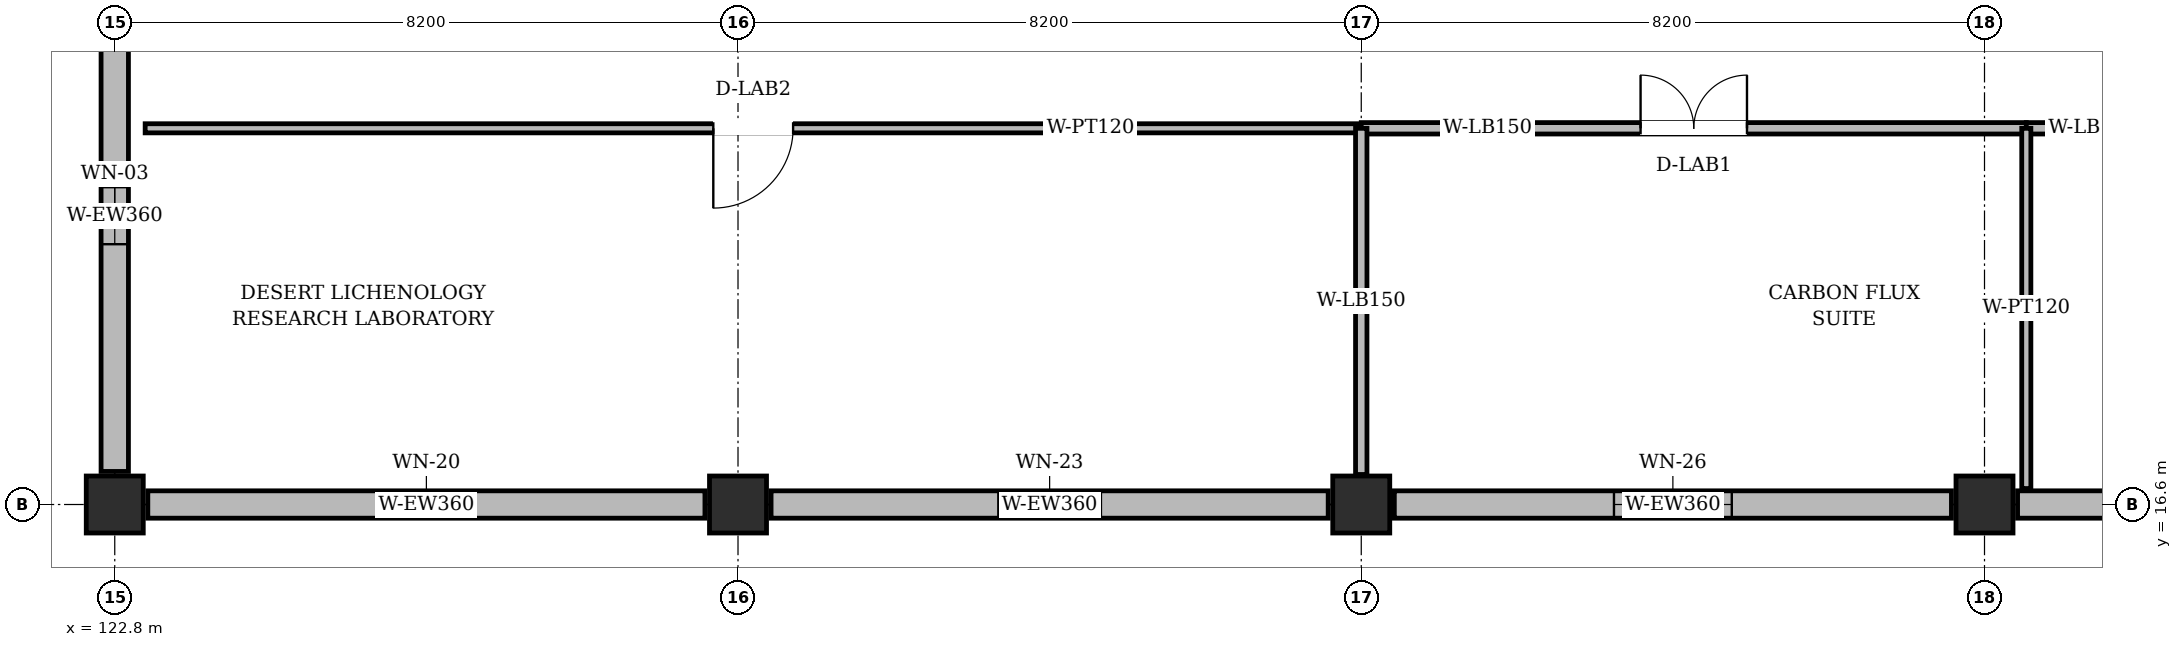
"""IFC4 building model, lengths in metres.
Left out: names, types, materials, properties, quantities, classifications, styles, units other than length and angle.
Written with IfcOpenShell. Run it as: python <this file> out.ifc"""

import sys

from ifc_helpers import new_model, si_unit, direction, frame, frame_2d, origin, origin_2d, place, context, subcontext, project, spatial, rectangle, extrude, element, fill, save


model = new_model("IFC4")
c1 = context("Model", 3, precision=1e-05, world=origin(), true_north=direction((0.0, 1.0)))
c2 = subcontext(c1, "Body", "Model", "MODEL_VIEW")
j1 = project(units=[si_unit("LENGTHUNIT", "METRE"), si_unit("PLANEANGLEUNIT", "RADIAN")], contexts=[c1])
p1 = place(None, origin())
s1 = spatial("IfcSite", under=j1, at=p1, CompositionType="ELEMENT")
p2 = place(p1, origin())
s2 = spatial("IfcBuilding", under=s1, at=p2, CompositionType="ELEMENT")
p3 = place(p2, frame((0.0, 0.0, 49.2)))
s3 = spatial("IfcBuildingStorey", under=s2, at=p3, CompositionType="ELEMENT", Elevation=49.2)
for number, where, z_axis, x_axis in (
    (1, (122.8, 16.6, 0.0), (0.0, 0.0, 1.0), (1.0, 0.0, 0.0)),
    (2, (131.0, 16.6, 0.0), (0.0, 0.0, 1.0), (1.0, 0.0, 0.0)),
    (3, (139.2, 16.6, 0.0), (0.0, 0.0, 1.0), (1.0, 0.0, 0.0)),
    (4, (147.4, 16.6, 0.0), (0.0, 0.0, 1.0), (1.0, 0.0, 0.0)),
):
    element("IfcColumn", number, at=place(p3, frame(where, z_axis=z_axis, x_axis=x_axis)), inside=s3, PredefinedType="COLUMN", context=c2, shape_type="SweptSolid", body=[
        extrude(rectangle(XDim=0.75, YDim=0.75, at=origin_2d()), origin(), (0.0, 0.0, 1.0), 3.945),
    ])
p4 = place(p3, frame((123.235, 16.6, 0.0), z_axis=(0.0, 0.0, 1.0), x_axis=(1.0, 0.0, 0.0)))
e5 = element("IfcWall", 5, at=p4, inside=s3, PredefinedType="SOLIDWALL", context=c2, shape_type="SweptSolid", body=[
    extrude(rectangle(XDim=7.33, YDim=0.36, at=frame_2d((3.665, 0.0))), origin(), (0.0, 0.0, 1.0), 3.33),
])
p5 = place(p4, frame((3.09, 0.0, 0.95)))
e6 = element("IfcOpeningElement", 6, at=p5, cuts=e5, PredefinedType="OPENING", context=c2, shape_type="SweptSolid", body=[
    extrude(rectangle(XDim=1.15, YDim=2.05, at=frame_2d((0.575, 1.025))), frame((0.0, 0.192, 0.0), z_axis=(0.0, -1.0, 0.0), x_axis=(1.0, 0.0, 0.0)), (0.0, 0.0, 1.0), 0.384),
])
p6 = place(p3, frame((131.435, 16.6, 0.0), z_axis=(0.0, 0.0, 1.0), x_axis=(1.0, 0.0, 0.0)))
e7 = element("IfcWall", 7, at=p6, inside=s3, PredefinedType="SOLIDWALL", context=c2, shape_type="SweptSolid", body=[
    extrude(rectangle(XDim=7.33, YDim=0.36, at=frame_2d((3.665, 0.0))), origin(), (0.0, 0.0, 1.0), 3.33),
])
p7 = place(p6, frame((2.99, 0.0, 0.95)))
e8 = element("IfcOpeningElement", 8, at=p7, cuts=e7, PredefinedType="OPENING", context=c2, shape_type="SweptSolid", body=[
    extrude(rectangle(XDim=1.35, YDim=1.75, at=frame_2d((0.675, 0.875))), frame((0.0, 0.192, 0.0), z_axis=(0.0, -1.0, 0.0), x_axis=(1.0, 0.0, 0.0)), (0.0, 0.0, 1.0), 0.384),
])
p8 = place(p3, frame((139.635, 16.6, 0.0), z_axis=(0.0, 0.0, 1.0), x_axis=(1.0, 0.0, 0.0)))
e9 = element("IfcWall", 9, at=p8, inside=s3, PredefinedType="SOLIDWALL", context=c2, shape_type="SweptSolid", body=[
    extrude(rectangle(XDim=7.33, YDim=0.36, at=frame_2d((3.665, 0.0))), origin(), (0.0, 0.0, 1.0), 3.33),
])
p9 = place(p8, frame((2.89, 0.0, 0.95)))
e10 = element("IfcOpeningElement", 10, at=p9, cuts=e9, PredefinedType="OPENING", context=c2, shape_type="SweptSolid", body=[
    extrude(rectangle(XDim=1.55, YDim=1.5, at=frame_2d((0.775, 0.75))), frame((0.0, 0.192, 0.0), z_axis=(0.0, -1.0, 0.0), x_axis=(1.0, 0.0, 0.0)), (0.0, 0.0, 1.0), 0.384),
])
p10 = place(p3, frame((147.835, 16.6, 0.0), z_axis=(0.0, 0.0, 1.0), x_axis=(1.0, 0.0, 0.0)))
e11 = element("IfcWall", 11, at=p10, inside=s3, PredefinedType="SOLIDWALL", context=c2, shape_type="SweptSolid", body=[
    extrude(rectangle(XDim=7.33, YDim=0.36, at=frame_2d((3.665, 0.0))), origin(), (0.0, 0.0, 1.0), 3.33),
])
p11 = place(p10, frame((3.215, 0.0, 0.95)))
e12 = element("IfcOpeningElement", 12, at=p11, cuts=e11, PredefinedType="OPENING", context=c2, shape_type="SweptSolid", body=[
    extrude(rectangle(XDim=0.9, YDim=2.1, at=frame_2d((0.45, 1.05))), frame((0.0, 0.192, 0.0), z_axis=(0.0, -1.0, 0.0), x_axis=(1.0, 0.0, 0.0)), (0.0, 0.0, 1.0), 0.384),
])
p12 = place(p3, frame((122.8, 23.765, 0.0), z_axis=(0.0, 0.0, 1.0), x_axis=(0.0, -1.0, 0.0)))
e13 = element("IfcWall", 13, at=p12, inside=s3, PredefinedType="SOLIDWALL", context=c2, shape_type="SweptSolid", body=[
    extrude(rectangle(XDim=6.73, YDim=0.36, at=frame_2d((3.365, 0.0))), origin(), (0.0, 0.0, 1.0), 3.33),
])
p13 = place(p12, frame((2.99, 0.0, 0.95)))
e14 = element("IfcOpeningElement", 14, at=p13, cuts=e13, PredefinedType="OPENING", context=c2, shape_type="SweptSolid", body=[
    extrude(rectangle(XDim=0.75, YDim=1.8, at=frame_2d((0.375, 0.9))), frame((0.0, 0.192, 0.0), z_axis=(0.0, -1.0, 0.0), x_axis=(1.0, 0.0, 0.0)), (0.0, 0.0, 1.0), 0.384),
])
p14 = place(p3, frame((139.2, 21.55, 0.0), z_axis=(0.0, 0.0, 1.0), x_axis=(-1.0, 0.0, 0.0)))
e15 = element("IfcWall", 15, at=p14, inside=s3, PredefinedType="PARTITIONING", context=c2, shape_type="SweptSolid", body=[
    extrude(rectangle(XDim=16.0, YDim=0.12, at=frame_2d((8.0, 0.0))), origin(), (0.0, 0.0, 1.0), 3.545),
])
p15 = place(p14, frame((7.475, 0.0, 0.0)))
e16 = element("IfcOpeningElement", 16, at=p15, cuts=e15, PredefinedType="OPENING", context=c2, shape_type="SweptSolid", body=[
    extrude(rectangle(XDim=1.05, YDim=2.2, at=frame_2d((0.525, 1.1))), frame((0.0, 0.072, 0.0), z_axis=(0.0, -1.0, 0.0), x_axis=(1.0, 0.0, 0.0)), (0.0, 0.0, 1.0), 0.144),
])
p16 = place(p3, frame((147.95, 21.55, 0.0), z_axis=(0.0, 0.0, 1.0), x_axis=(-1.0, 0.0, 0.0)))
e17 = element("IfcWall", 17, at=p16, inside=s3, PredefinedType="PARTITIONING", context=c2, shape_type="SweptSolid", body=[
    extrude(rectangle(XDim=8.75, YDim=0.15, at=frame_2d((4.375, 0.0))), origin(), (0.0, 0.0, 1.0), 3.475),
])
p17 = place(p16, frame((3.675, 0.0, 0.0)))
e18 = element("IfcOpeningElement", 18, at=p17, cuts=e17, PredefinedType="OPENING", context=c2, shape_type="SweptSolid", body=[
    extrude(rectangle(XDim=1.4, YDim=2.2, at=frame_2d((0.7, 1.1))), frame((0.0, 0.087, 0.0), z_axis=(0.0, -1.0, 0.0), x_axis=(1.0, 0.0, 0.0)), (0.0, 0.0, 1.0), 0.174),
])
p18 = place(p3, frame((149.7, 21.55, 0.0), z_axis=(0.0, 0.0, 1.0), x_axis=(-1.0, 0.0, 0.0)))
e19 = element("IfcWall", 19, at=p18, inside=s3, PredefinedType="PARTITIONING", context=c2, shape_type="SweptSolid", body=[
    extrude(rectangle(XDim=1.75, YDim=0.15, at=frame_2d((0.875, 0.0))), origin(), (0.0, 0.0, 1.0), 3.475),
])
p19 = place(p3, frame((139.2, 21.55, 0.0), z_axis=(0.0, 0.0, 1.0), x_axis=(0.0, -1.0, 0.0)))
e20 = element("IfcWall", 20, at=p19, inside=s3, PredefinedType="PARTITIONING", context=c2, shape_type="SweptSolid", body=[
    extrude(rectangle(XDim=4.555, YDim=0.15, at=frame_2d((2.277, 0.0))), origin(), (0.0, 0.0, 1.0), 3.235),
])
p20 = place(p3, frame((147.95, 21.55, 0.0), z_axis=(0.0, 0.0, 1.0), x_axis=(0.0, -1.0, 0.0)))
e21 = element("IfcWall", 21, at=p20, inside=s3, PredefinedType="PARTITIONING", context=c2, shape_type="SweptSolid", body=[
    extrude(rectangle(XDim=4.74, YDim=0.12, at=frame_2d((2.37, 0.0))), origin(), (0.0, 0.0, 1.0), 3.805),
])
p21 = place(p5, origin())
e22 = element("IfcWindow", 22, at=p21, inside=s3, PartitioningType="SINGLE_PANEL", PredefinedType="WINDOW", context=c2, shape_type="SweptSolid", body=[
    extrude(rectangle(XDim=1.15, YDim=2.05, at=frame_2d((0.575, 1.025))), frame((0.0, 0.03, 0.0), z_axis=(0.0, -1.0, 0.0), x_axis=(1.0, 0.0, 0.0)), (0.0, 0.0, 1.0), 0.06),
])
fill(e6, e22)
p22 = place(p7, origin())
e23 = element("IfcWindow", 23, at=p22, inside=s3, PartitioningType="SINGLE_PANEL", PredefinedType="WINDOW", context=c2, shape_type="SweptSolid", body=[
    extrude(rectangle(XDim=1.35, YDim=1.75, at=frame_2d((0.675, 0.875))), frame((0.0, 0.03, 0.0), z_axis=(0.0, -1.0, 0.0), x_axis=(1.0, 0.0, 0.0)), (0.0, 0.0, 1.0), 0.06),
])
fill(e8, e23)
p23 = place(p9, origin())
e24 = element("IfcWindow", 24, at=p23, inside=s3, PartitioningType="DOUBLE_PANEL_VERTICAL", PredefinedType="WINDOW", context=c2, shape_type="SweptSolid", body=[
    extrude(rectangle(XDim=1.55, YDim=1.5, at=frame_2d((0.775, 0.75))), frame((0.0, 0.03, 0.0), z_axis=(0.0, -1.0, 0.0), x_axis=(1.0, 0.0, 0.0)), (0.0, 0.0, 1.0), 0.06),
])
fill(e10, e24)
p24 = place(p13, origin())
e25 = element("IfcWindow", 25, at=p24, inside=s3, PartitioningType="SINGLE_PANEL", PredefinedType="WINDOW", context=c2, shape_type="SweptSolid", body=[
    extrude(rectangle(XDim=0.75, YDim=1.8, at=frame_2d((0.375, 0.9))), frame((0.0, 0.03, 0.0), z_axis=(0.0, -1.0, 0.0), x_axis=(1.0, 0.0, 0.0)), (0.0, 0.0, 1.0), 0.06),
])
fill(e14, e25)
p25 = place(p15, origin())
e26 = element("IfcDoor", 26, at=p25, inside=s3, OperationType="SINGLE_SWING_RIGHT", PredefinedType="DOOR", context=c2, shape_type="SweptSolid", body=[
    extrude(rectangle(XDim=1.05, YDim=2.2, at=frame_2d((0.525, 1.1))), frame((0.0, 0.025, 0.0), z_axis=(0.0, -1.0, 0.0), x_axis=(1.0, 0.0, 0.0)), (0.0, 0.0, 1.0), 0.05),
])
fill(e16, e26)
p26 = place(p17, frame((1.4, 0.0, 0.0), z_axis=(0.0, 0.0, 1.0), x_axis=(-1.0, 0.0, 0.0)))
e27 = element("IfcDoor", 27, at=p26, inside=s3, OperationType="DOUBLE_DOOR_SINGLE_SWING", PredefinedType="DOOR", context=c2, shape_type="SweptSolid", body=[
    extrude(rectangle(XDim=1.4, YDim=2.2, at=frame_2d((0.7, 1.1))), frame((0.0, 0.025, 0.0), z_axis=(0.0, -1.0, 0.0), x_axis=(1.0, 0.0, 0.0)), (0.0, 0.0, 1.0), 0.05),
])
fill(e18, e27)
save(model, sys.argv[1])
